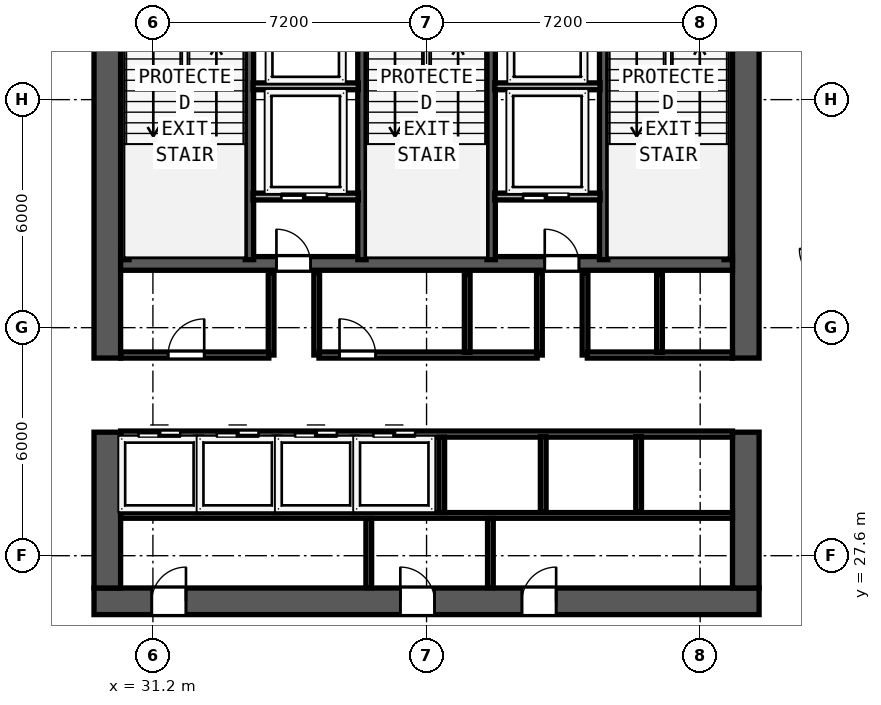
"""IFC4 building model, lengths in metres.
Left out: names, types, materials, properties, quantities, classifications, styles, units other than length and angle.
Written with IfcOpenShell. Run it as: python <this file> out.ifc"""

import sys

from ifc_helpers import new_model, si_unit, direction, frame, frame_2d, origin, place, context, subcontext, project, spatial, rectangle, extrude, element, fill, save


model = new_model("IFC4")
c1 = context("Model", 3, precision=1e-05, world=origin(), true_north=direction((0.0, 1.0)))
c2 = subcontext(c1, "Body", "Model", "MODEL_VIEW")
j1 = project(units=[si_unit("LENGTHUNIT", "METRE"), si_unit("PLANEANGLEUNIT", "RADIAN")], contexts=[c1])
p1 = place(None, origin())
s1 = spatial("IfcSite", under=j1, at=p1, CompositionType="ELEMENT")
p2 = place(p1, origin())
s2 = spatial("IfcBuilding", under=s1, at=p2, CompositionType="ELEMENT")
p3 = place(p2, frame((0.0, 0.0, 106.0)))
s3 = spatial("IfcBuildingStorey", under=s2, at=p3, CompositionType="ELEMENT", Elevation=106.0)
p4 = place(p3, frame((29.65, 26.4, 0.0), z_axis=(0.0, 0.0, 1.0), x_axis=(1.0, 0.0, 0.0)))
e1 = element("IfcWall", 1, at=p4, inside=s3, PredefinedType="SHEAR", context=c2, shape_type="SweptSolid", body=[
    extrude(rectangle(XDim=17.5, YDim=0.7, at=frame_2d((8.75, 0.0))), origin(), (0.0, 0.0, 1.0), 3.6),
])
p5 = place(p4, frame((2.42, 0.0, 0.0), z_axis=(0.0, 0.0, 1.0), x_axis=(-1.0, 0.0, 0.0)))
e2 = element("IfcOpeningElement", 2, at=p5, cuts=e1, PredefinedType="OPENING", context=c2, shape_type="SweptSolid", body=[
    extrude(rectangle(XDim=0.9, YDim=2.1, at=frame_2d((0.45, 1.05))), frame((0.0, 0.36, 0.0), z_axis=(0.0, -1.0, 0.0), x_axis=(1.0, 0.0, 0.0)), (0.0, 0.0, 1.0), 0.72),
])
p6 = place(p4, frame((8.96, 0.0, 0.0), z_axis=(0.0, 0.0, 1.0), x_axis=(-1.0, 0.0, 0.0)))
e3 = element("IfcOpeningElement", 3, at=p6, cuts=e1, PredefinedType="OPENING", context=c2, shape_type="SweptSolid", body=[
    extrude(rectangle(XDim=0.9, YDim=2.1, at=frame_2d((0.45, 1.05))), frame((0.0, 0.36, 0.0), z_axis=(0.0, -1.0, 0.0), x_axis=(1.0, 0.0, 0.0)), (0.0, 0.0, 1.0), 0.72),
])
p7 = place(p4, frame((12.16, 0.0, 0.0), z_axis=(0.0, 0.0, 1.0), x_axis=(-1.0, 0.0, 0.0)))
e4 = element("IfcOpeningElement", 4, at=p7, cuts=e1, PredefinedType="OPENING", context=c2, shape_type="SweptSolid", body=[
    extrude(rectangle(XDim=0.9, YDim=2.1, at=frame_2d((0.45, 1.05))), frame((0.0, 0.36, 0.0), z_axis=(0.0, -1.0, 0.0), x_axis=(1.0, 0.0, 0.0)), (0.0, 0.0, 1.0), 0.72),
])
p8 = place(p3, frame((30.0, 26.75, 0.0), z_axis=(0.0, 0.0, 1.0), x_axis=(0.0, 1.0, 0.0)))
e5 = element("IfcWall", 5, at=p8, inside=s3, PredefinedType="SHEAR", context=c2, shape_type="SweptSolid", body=[
    extrude(rectangle(XDim=4.1, YDim=0.7, at=frame_2d((2.05, 0.0))), origin(), (0.0, 0.0, 1.0), 3.6),
])
p9 = place(p3, frame((30.0, 32.8, 0.0), z_axis=(0.0, 0.0, 1.0), x_axis=(0.0, 1.0, 0.0)))
e6 = element("IfcWall", 6, at=p9, inside=s3, PredefinedType="SHEAR", context=c2, shape_type="SweptSolid", body=[
    extrude(rectangle(XDim=10.05, YDim=0.7, at=frame_2d((5.025, 0.0))), origin(), (0.0, 0.0, 1.0), 3.6),
])
p10 = place(p3, frame((46.8, 26.75, 0.0), z_axis=(0.0, 0.0, 1.0), x_axis=(0.0, 1.0, 0.0)))
e7 = element("IfcWall", 7, at=p10, inside=s3, PredefinedType="SHEAR", context=c2, shape_type="SweptSolid", body=[
    extrude(rectangle(XDim=4.1, YDim=0.7, at=frame_2d((2.05, 0.0))), origin(), (0.0, 0.0, 1.0), 3.6),
])
p11 = place(p3, frame((46.8, 32.8, 0.0), z_axis=(0.0, 0.0, 1.0), x_axis=(0.0, 1.0, 0.0)))
e8 = element("IfcWall", 8, at=p11, inside=s3, PredefinedType="SHEAR", context=c2, shape_type="SweptSolid", body=[
    extrude(rectangle(XDim=10.05, YDim=0.7, at=frame_2d((5.025, 0.0))), origin(), (0.0, 0.0, 1.0), 3.6),
])
p12 = place(p3, frame((30.35, 35.29, 0.0), z_axis=(0.0, 0.0, 1.0), x_axis=(1.0, 0.0, 0.0)))
e9 = element("IfcWall", 9, at=p12, inside=s3, PredefinedType="SHEAR", context=c2, shape_type="SweptSolid", body=[
    extrude(rectangle(XDim=16.1, YDim=0.36, at=frame_2d((8.05, 0.0))), origin(), (0.0, 0.0, 1.0), 3.6),
])
p13 = place(p12, frame((5.0, 0.0, 0.0), z_axis=(0.0, 0.0, 1.0), x_axis=(-1.0, 0.0, 0.0)))
e10 = element("IfcOpeningElement", 10, at=p13, cuts=e9, PredefinedType="OPENING", context=c2, shape_type="SweptSolid", body=[
    extrude(rectangle(XDim=0.9, YDim=2.1, at=frame_2d((0.45, 1.05))), frame((0.0, 0.19, 0.0), z_axis=(0.0, -1.0, 0.0), x_axis=(1.0, 0.0, 0.0)), (0.0, 0.0, 1.0), 0.38),
])
p14 = place(p12, frame((12.06, 0.0, 0.0), z_axis=(0.0, 0.0, 1.0), x_axis=(-1.0, 0.0, 0.0)))
e11 = element("IfcOpeningElement", 11, at=p14, cuts=e9, PredefinedType="OPENING", context=c2, shape_type="SweptSolid", body=[
    extrude(rectangle(XDim=0.9, YDim=2.1, at=frame_2d((0.45, 1.05))), frame((0.0, 0.19, 0.0), z_axis=(0.0, -1.0, 0.0), x_axis=(1.0, 0.0, 0.0)), (0.0, 0.0, 1.0), 0.38),
])
for number, where, z_axis, x_axis in (
    (12, (30.462, 35.39, 0.0), (0.0, 0.0, 1.0), (0.0, 1.0, 0.0)),
    (13, (33.74, 35.39, 0.0), (0.0, 0.0, 1.0), (0.0, 1.0, 0.0)),
    (14, (36.7, 35.39, 0.0), (0.0, 0.0, 1.0), (0.0, 1.0, 0.0)),
    (15, (40.1, 35.39, 0.0), (0.0, 0.0, 1.0), (0.0, 1.0, 0.0)),
    (16, (43.06, 35.39, 0.0), (0.0, 0.0, 1.0), (0.0, 1.0, 0.0)),
    (17, (46.338, 35.39, 0.0), (0.0, 0.0, 1.0), (0.0, 1.0, 0.0)),
):
    element("IfcWall", number, at=place(p3, frame(where, z_axis=z_axis, x_axis=x_axis)), inside=s3, PredefinedType="SHEAR", context=c2, shape_type="SweptSolid", body=[
        extrude(rectangle(XDim=7.46, YDim=0.22, at=frame_2d((3.73, 0.0))), origin(), (0.0, 0.0, 1.0), 3.6),
    ])
for number, where, z_axis, x_axis in (
    (18, (33.835, 39.95, 0.0), (0.0, 0.0, 1.0), (1.0, 0.0, 0.0)),
    (19, (40.195, 39.95, 0.0), (0.0, 0.0, 1.0), (1.0, 0.0, 0.0)),
):
    element("IfcWall", number, at=place(p3, frame(where, z_axis=z_axis, x_axis=x_axis)), inside=s3, PredefinedType="SOLIDWALL", context=c2, shape_type="SweptSolid", body=[
        extrude(rectangle(XDim=2.77, YDim=0.18, at=frame_2d((1.385, 0.0))), origin(), (0.0, 0.0, 1.0), 3.6),
    ])
p15 = place(p3, frame((33.835, 37.05, 0.0), z_axis=(0.0, 0.0, 1.0), x_axis=(1.0, 0.0, 0.0)))
e20 = element("IfcWall", 20, at=p15, inside=s3, PredefinedType="SOLIDWALL", context=c2, shape_type="SweptSolid", body=[
    extrude(rectangle(XDim=2.77, YDim=0.18, at=frame_2d((1.385, 0.0))), origin(), (0.0, 0.0, 1.0), 3.6),
])
p16 = place(p15, frame((1.945, 0.0, 0.0), z_axis=(0.0, 0.0, 1.0), x_axis=(-1.0, 0.0, 0.0)))
e21 = element("IfcOpeningElement", 21, at=p16, cuts=e20, PredefinedType="OPENING", context=c2, shape_type="SweptSolid", body=[
    extrude(rectangle(XDim=1.2, YDim=2.2, at=frame_2d((0.6, 1.1))), frame((0.0, 0.1, 0.0), z_axis=(0.0, -1.0, 0.0), x_axis=(1.0, 0.0, 0.0)), (0.0, 0.0, 1.0), 0.2),
])
for number, where, z_axis, x_axis in (
    (22, (34.31, 32.88, 0.0), (0.0, 0.0, 1.0), (0.0, 1.0, 0.0)),
    (23, (35.51, 32.88, 0.0), (0.0, 0.0, 1.0), (0.0, 1.0, 0.0)),
):
    element("IfcWall", number, at=place(p3, frame(where, z_axis=z_axis, x_axis=x_axis)), inside=s3, PredefinedType="SOLIDWALL", context=c2, shape_type="SweptSolid", body=[
        extrude(rectangle(XDim=2.17, YDim=0.15, at=frame_2d((1.085, 0.0))), origin(), (0.0, 0.0, 1.0), 3.6),
    ])
p17 = place(p3, frame((40.195, 37.05, 0.0), z_axis=(0.0, 0.0, 1.0), x_axis=(1.0, 0.0, 0.0)))
e24 = element("IfcWall", 24, at=p17, inside=s3, PredefinedType="SOLIDWALL", context=c2, shape_type="SweptSolid", body=[
    extrude(rectangle(XDim=2.77, YDim=0.18, at=frame_2d((1.385, 0.0))), origin(), (0.0, 0.0, 1.0), 3.6),
])
p18 = place(p17, frame((1.945, 0.0, 0.0), z_axis=(0.0, 0.0, 1.0), x_axis=(-1.0, 0.0, 0.0)))
e25 = element("IfcOpeningElement", 25, at=p18, cuts=e24, PredefinedType="OPENING", context=c2, shape_type="SweptSolid", body=[
    extrude(rectangle(XDim=1.2, YDim=2.2, at=frame_2d((0.6, 1.1))), frame((0.0, 0.1, 0.0), z_axis=(0.0, -1.0, 0.0), x_axis=(1.0, 0.0, 0.0)), (0.0, 0.0, 1.0), 0.2),
])
for number, where, z_axis, x_axis in (
    (26, (41.37, 32.88, 0.0), (0.0, 0.0, 1.0), (0.0, 1.0, 0.0)),
    (27, (42.57, 32.88, 0.0), (0.0, 0.0, 1.0), (0.0, 1.0, 0.0)),
):
    element("IfcWall", number, at=place(p3, frame(where, z_axis=z_axis, x_axis=x_axis)), inside=s3, PredefinedType="SOLIDWALL", context=c2, shape_type="SweptSolid", body=[
        extrude(rectangle(XDim=2.17, YDim=0.15, at=frame_2d((1.085, 0.0))), origin(), (0.0, 0.0, 1.0), 3.6),
    ])
p19 = place(p3, frame((30.35, 32.88, 0.0), z_axis=(0.0, 0.0, 1.0), x_axis=(1.0, 0.0, 0.0)))
e28 = element("IfcWall", 28, at=p19, inside=s3, PredefinedType="SOLIDWALL", context=c2, shape_type="SweptSolid", body=[
    extrude(rectangle(XDim=3.9, YDim=0.16, at=frame_2d((1.95, 0.0))), origin(), (0.0, 0.0, 1.0), 3.6),
])
p20 = place(p19, frame((2.2, 0.0, 0.0), z_axis=(0.0, 0.0, 1.0), x_axis=(-1.0, 0.0, 0.0)))
e29 = element("IfcOpeningElement", 29, at=p20, cuts=e28, PredefinedType="OPENING", context=c2, shape_type="SweptSolid", body=[
    extrude(rectangle(XDim=0.95, YDim=2.12, at=frame_2d((0.475, 1.06))), frame((0.0, 0.09, 0.0), z_axis=(0.0, -1.0, 0.0), x_axis=(1.0, 0.0, 0.0)), (0.0, 0.0, 1.0), 0.18),
])
p21 = place(p3, frame((35.57, 32.88, 0.0), z_axis=(0.0, 0.0, 1.0), x_axis=(1.0, 0.0, 0.0)))
e30 = element("IfcWall", 30, at=p21, inside=s3, PredefinedType="SOLIDWALL", context=c2, shape_type="SweptSolid", body=[
    extrude(rectangle(XDim=5.74, YDim=0.16, at=frame_2d((2.87, 0.0))), origin(), (0.0, 0.0, 1.0), 3.6),
])
p22 = place(p21, frame((1.49, 0.0, 0.0), z_axis=(0.0, 0.0, 1.0), x_axis=(-1.0, 0.0, 0.0)))
e31 = element("IfcOpeningElement", 31, at=p22, cuts=e30, PredefinedType="OPENING", context=c2, shape_type="SweptSolid", body=[
    extrude(rectangle(XDim=0.95, YDim=2.12, at=frame_2d((0.475, 1.06))), frame((0.0, 0.09, 0.0), z_axis=(0.0, -1.0, 0.0), x_axis=(1.0, 0.0, 0.0)), (0.0, 0.0, 1.0), 0.18),
])
p23 = place(p3, frame((42.63, 32.88, 0.0), z_axis=(0.0, 0.0, 1.0), x_axis=(1.0, 0.0, 0.0)))
e32 = element("IfcWall", 32, at=p23, inside=s3, PredefinedType="SOLIDWALL", context=c2, shape_type="SweptSolid", body=[
    extrude(rectangle(XDim=3.82, YDim=0.16, at=frame_2d((1.91, 0.0))), origin(), (0.0, 0.0, 1.0), 3.6),
])
for number, where, z_axis, x_axis in (
    (33, (39.47, 32.95, 0.0), (0.0, 0.0, 1.0), (0.0, 1.0, 0.0)),
    (34, (44.53, 32.95, 0.0), (0.0, 0.0, 1.0), (0.0, 1.0, 0.0)),
):
    element("IfcWall", number, at=place(p3, frame(where, z_axis=z_axis, x_axis=x_axis)), inside=s3, PredefinedType="SOLIDWALL", context=c2, shape_type="SweptSolid", body=[
        extrude(rectangle(XDim=2.05, YDim=0.15, at=frame_2d((1.025, 0.0))), origin(), (0.0, 0.0, 1.0), 3.6),
    ])
p24 = place(p3, frame((30.35, 30.8, 0.0), z_axis=(0.0, 0.0, 1.0), x_axis=(1.0, 0.0, 0.0)))
e35 = element("IfcWall", 35, at=p24, inside=s3, PredefinedType="SOLIDWALL", context=c2, shape_type="SweptSolid", body=[
    extrude(rectangle(XDim=16.1, YDim=0.16, at=frame_2d((8.05, 0.0))), origin(), (0.0, 0.0, 1.0), 3.6),
])
p25 = place(p24, frame((0.47, 0.0, 0.0)))
e36 = element("IfcOpeningElement", 36, at=p25, cuts=e35, PredefinedType="OPENING", context=c2, shape_type="SweptSolid", body=[
    extrude(rectangle(XDim=1.1, YDim=2.2, at=frame_2d((0.55, 1.1))), frame((0.0, 0.09, 0.0), z_axis=(0.0, -1.0, 0.0), x_axis=(1.0, 0.0, 0.0)), (0.0, 0.0, 1.0), 0.18),
])
p26 = place(p24, frame((2.53, 0.0, 0.0)))
e37 = element("IfcOpeningElement", 37, at=p26, cuts=e35, PredefinedType="OPENING", context=c2, shape_type="SweptSolid", body=[
    extrude(rectangle(XDim=1.1, YDim=2.2, at=frame_2d((0.55, 1.1))), frame((0.0, 0.09, 0.0), z_axis=(0.0, -1.0, 0.0), x_axis=(1.0, 0.0, 0.0)), (0.0, 0.0, 1.0), 0.18),
])
p27 = place(p24, frame((4.59, 0.0, 0.0)))
e38 = element("IfcOpeningElement", 38, at=p27, cuts=e35, PredefinedType="OPENING", context=c2, shape_type="SweptSolid", body=[
    extrude(rectangle(XDim=1.1, YDim=2.2, at=frame_2d((0.55, 1.1))), frame((0.0, 0.09, 0.0), z_axis=(0.0, -1.0, 0.0), x_axis=(1.0, 0.0, 0.0)), (0.0, 0.0, 1.0), 0.18),
])
p28 = place(p24, frame((6.65, 0.0, 0.0)))
e39 = element("IfcOpeningElement", 39, at=p28, cuts=e35, PredefinedType="OPENING", context=c2, shape_type="SweptSolid", body=[
    extrude(rectangle(XDim=1.1, YDim=2.2, at=frame_2d((0.55, 1.1))), frame((0.0, 0.09, 0.0), z_axis=(0.0, -1.0, 0.0), x_axis=(1.0, 0.0, 0.0)), (0.0, 0.0, 1.0), 0.18),
])
p29 = place(p3, frame((30.35, 28.66, 0.0), z_axis=(0.0, 0.0, 1.0), x_axis=(1.0, 0.0, 0.0)))
e40 = element("IfcWall", 40, at=p29, inside=s3, PredefinedType="PARTITIONING", context=c2, shape_type="SweptSolid", body=[
    extrude(rectangle(XDim=16.1, YDim=0.15, at=frame_2d((8.05, 0.0))), origin(), (0.0, 0.0, 1.0), 3.6),
])
for number, where, z_axis, x_axis in (
    (41, (32.4, 28.735, 0.0), (0.0, 0.0, 1.0), (0.0, 1.0, 0.0)),
    (42, (34.46, 28.735, 0.0), (0.0, 0.0, 1.0), (0.0, 1.0, 0.0)),
    (43, (36.52, 28.735, 0.0), (0.0, 0.0, 1.0), (0.0, 1.0, 0.0)),
    (44, (38.8, 28.735, 0.0), (0.0, 0.0, 1.0), (0.0, 1.0, 0.0)),
):
    element("IfcWall", number, at=place(p3, frame(where, z_axis=z_axis, x_axis=x_axis)), inside=s3, PredefinedType="SOLIDWALL", context=c2, shape_type="SweptSolid", body=[
        extrude(rectangle(XDim=1.985, YDim=0.15, at=frame_2d((0.992, 0.0))), origin(), (0.0, 0.0, 1.0), 3.6),
    ])
for number, where, z_axis, x_axis in (
    (45, (36.88, 26.76, 0.0), (0.0, 0.0, 1.0), (0.0, 1.0, 0.0)),
    (46, (40.08, 26.76, 0.0), (0.0, 0.0, 1.0), (0.0, 1.0, 0.0)),
):
    element("IfcWall", number, at=place(p3, frame(where, z_axis=z_axis, x_axis=x_axis)), inside=s3, PredefinedType="PARTITIONING", context=c2, shape_type="SweptSolid", body=[
        extrude(rectangle(XDim=1.82, YDim=0.15, at=frame_2d((0.91, 0.0))), origin(), (0.0, 0.0, 1.0), 3.6),
    ])
for number, where, z_axis, x_axis in (
    (47, (41.47, 28.75, 0.0), (0.0, 0.0, 1.0), (0.0, 1.0, 0.0)),
    (48, (43.98, 28.75, 0.0), (0.0, 0.0, 1.0), (0.0, 1.0, 0.0)),
):
    element("IfcWall", number, at=place(p3, frame(where, z_axis=z_axis, x_axis=x_axis)), inside=s3, PredefinedType="SOLIDWALL", context=c2, shape_type="SweptSolid", body=[
        extrude(rectangle(XDim=1.985, YDim=0.15, at=frame_2d((0.993, 0.0))), origin(), (0.0, 0.0, 1.0), 3.6),
    ])
p30 = place(p16, origin())
e49 = element("IfcDoor", 49, at=p30, inside=s3, OperationType="SLIDING_TO_RIGHT", PredefinedType="DOOR", context=c2, shape_type="SweptSolid", body=[
    extrude(rectangle(XDim=1.2, YDim=2.2, at=frame_2d((0.6, 1.1))), frame((0.0, 0.025, 0.0), z_axis=(0.0, -1.0, 0.0), x_axis=(1.0, 0.0, 0.0)), (0.0, 0.0, 1.0), 0.05),
])
fill(e21, e49)
p31 = place(p13, origin())
e50 = element("IfcDoor", 50, at=p31, inside=s3, OperationType="SINGLE_SWING_RIGHT", PredefinedType="DOOR", context=c2, shape_type="SweptSolid", body=[
    extrude(rectangle(XDim=0.9, YDim=2.1, at=frame_2d((0.45, 1.05))), frame((0.0, 0.025, 0.0), z_axis=(0.0, -1.0, 0.0), x_axis=(1.0, 0.0, 0.0)), (0.0, 0.0, 1.0), 0.05),
])
fill(e10, e50)
p32 = place(p18, origin())
e51 = element("IfcDoor", 51, at=p32, inside=s3, OperationType="SLIDING_TO_RIGHT", PredefinedType="DOOR", context=c2, shape_type="SweptSolid", body=[
    extrude(rectangle(XDim=1.2, YDim=2.2, at=frame_2d((0.6, 1.1))), frame((0.0, 0.025, 0.0), z_axis=(0.0, -1.0, 0.0), x_axis=(1.0, 0.0, 0.0)), (0.0, 0.0, 1.0), 0.05),
])
fill(e25, e51)
p33 = place(p14, origin())
e52 = element("IfcDoor", 52, at=p33, inside=s3, OperationType="SINGLE_SWING_RIGHT", PredefinedType="DOOR", context=c2, shape_type="SweptSolid", body=[
    extrude(rectangle(XDim=0.9, YDim=2.1, at=frame_2d((0.45, 1.05))), frame((0.0, 0.025, 0.0), z_axis=(0.0, -1.0, 0.0), x_axis=(1.0, 0.0, 0.0)), (0.0, 0.0, 1.0), 0.05),
])
fill(e11, e52)
p34 = place(p20, origin())
e53 = element("IfcDoor", 53, at=p34, inside=s3, OperationType="SINGLE_SWING_LEFT", PredefinedType="DOOR", context=c2, shape_type="SweptSolid", body=[
    extrude(rectangle(XDim=0.95, YDim=2.12, at=frame_2d((0.475, 1.06))), frame((0.0, 0.025, 0.0), z_axis=(0.0, -1.0, 0.0), x_axis=(1.0, 0.0, 0.0)), (0.0, 0.0, 1.0), 0.05),
])
fill(e29, e53)
p35 = place(p22, origin())
e54 = element("IfcDoor", 54, at=p35, inside=s3, OperationType="SINGLE_SWING_RIGHT", PredefinedType="DOOR", context=c2, shape_type="SweptSolid", body=[
    extrude(rectangle(XDim=0.95, YDim=2.12, at=frame_2d((0.475, 1.06))), frame((0.0, 0.025, 0.0), z_axis=(0.0, -1.0, 0.0), x_axis=(1.0, 0.0, 0.0)), (0.0, 0.0, 1.0), 0.05),
])
fill(e31, e54)
p36 = place(p25, origin())
e55 = element("IfcDoor", 55, at=p36, inside=s3, OperationType="SLIDING_TO_LEFT", PredefinedType="DOOR", context=c2, shape_type="SweptSolid", body=[
    extrude(rectangle(XDim=1.1, YDim=2.2, at=frame_2d((0.55, 1.1))), frame((0.0, 0.025, 0.0), z_axis=(0.0, -1.0, 0.0), x_axis=(1.0, 0.0, 0.0)), (0.0, 0.0, 1.0), 0.05),
])
fill(e36, e55)
p37 = place(p26, origin())
e56 = element("IfcDoor", 56, at=p37, inside=s3, OperationType="SLIDING_TO_LEFT", PredefinedType="DOOR", context=c2, shape_type="SweptSolid", body=[
    extrude(rectangle(XDim=1.1, YDim=2.2, at=frame_2d((0.55, 1.1))), frame((0.0, 0.025, 0.0), z_axis=(0.0, -1.0, 0.0), x_axis=(1.0, 0.0, 0.0)), (0.0, 0.0, 1.0), 0.05),
])
fill(e37, e56)
p38 = place(p27, origin())
e57 = element("IfcDoor", 57, at=p38, inside=s3, OperationType="SLIDING_TO_LEFT", PredefinedType="DOOR", context=c2, shape_type="SweptSolid", body=[
    extrude(rectangle(XDim=1.1, YDim=2.2, at=frame_2d((0.55, 1.1))), frame((0.0, 0.025, 0.0), z_axis=(0.0, -1.0, 0.0), x_axis=(1.0, 0.0, 0.0)), (0.0, 0.0, 1.0), 0.05),
])
fill(e38, e57)
p39 = place(p28, origin())
e58 = element("IfcDoor", 58, at=p39, inside=s3, OperationType="SLIDING_TO_LEFT", PredefinedType="DOOR", context=c2, shape_type="SweptSolid", body=[
    extrude(rectangle(XDim=1.1, YDim=2.2, at=frame_2d((0.55, 1.1))), frame((0.0, 0.025, 0.0), z_axis=(0.0, -1.0, 0.0), x_axis=(1.0, 0.0, 0.0)), (0.0, 0.0, 1.0), 0.05),
])
fill(e39, e58)
p40 = place(p5, origin())
e59 = element("IfcDoor", 59, at=p40, inside=s3, OperationType="SINGLE_SWING_LEFT", PredefinedType="DOOR", context=c2, shape_type="SweptSolid", body=[
    extrude(rectangle(XDim=0.9, YDim=2.1, at=frame_2d((0.45, 1.05))), frame((0.0, -0.195, 0.0), z_axis=(0.0, -1.0, 0.0), x_axis=(1.0, 0.0, 0.0)), (0.0, 0.0, 1.0), 0.05),
])
fill(e2, e59)
p41 = place(p6, origin())
e60 = element("IfcDoor", 60, at=p41, inside=s3, OperationType="SINGLE_SWING_RIGHT", PredefinedType="DOOR", context=c2, shape_type="SweptSolid", body=[
    extrude(rectangle(XDim=0.9, YDim=2.1, at=frame_2d((0.45, 1.05))), frame((0.0, -0.195, 0.0), z_axis=(0.0, -1.0, 0.0), x_axis=(1.0, 0.0, 0.0)), (0.0, 0.0, 1.0), 0.05),
])
fill(e3, e60)
p42 = place(p7, origin())
e61 = element("IfcDoor", 61, at=p42, inside=s3, OperationType="SINGLE_SWING_LEFT", PredefinedType="DOOR", context=c2, shape_type="SweptSolid", body=[
    extrude(rectangle(XDim=0.9, YDim=2.1, at=frame_2d((0.45, 1.05))), frame((0.0, -0.195, 0.0), z_axis=(0.0, -1.0, 0.0), x_axis=(1.0, 0.0, 0.0)), (0.0, 0.0, 1.0), 0.05),
])
fill(e4, e61)
save(model, sys.argv[1])
